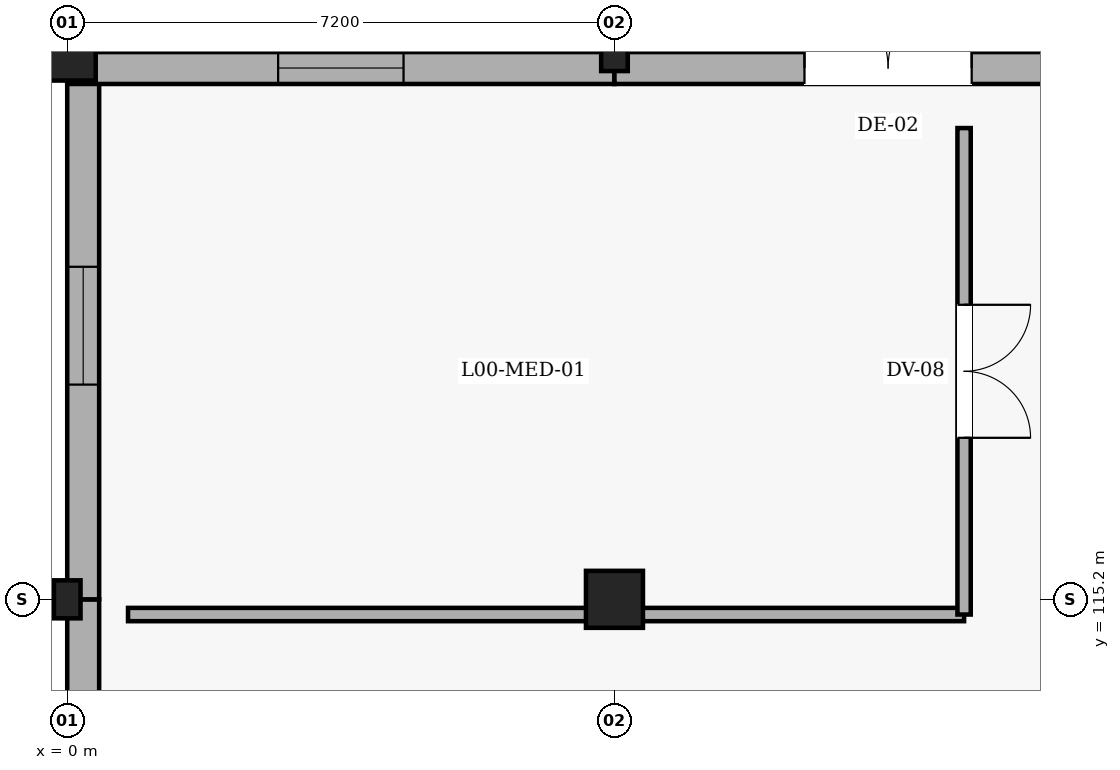
"""IFC4 building model, lengths in metres.
Left out: names, types, materials, properties, quantities, classifications, styles, units other than length and angle.
Written with IfcOpenShell. Run it as: python <this file> out.ifc"""

import sys

from ifc_helpers import new_model, si_unit, direction, frame, frame_2d, origin, origin_2d, place, context, subcontext, project, spatial, rectangle, extrude, element, fill, save


model = new_model("IFC4")
c1 = context("Model", 3, precision=1e-05, world=origin(), true_north=direction((0.0, 1.0)))
c2 = subcontext(c1, "Body", "Model", "MODEL_VIEW")
j1 = project(units=[si_unit("LENGTHUNIT", "METRE"), si_unit("PLANEANGLEUNIT", "RADIAN")], contexts=[c1])
p1 = place(None, origin())
s1 = spatial("IfcSite", under=j1, at=p1, CompositionType="ELEMENT")
p2 = place(p1, origin())
s2 = spatial("IfcBuilding", under=s1, at=p2, CompositionType="ELEMENT")
p3 = place(p2, origin())
s3 = spatial("IfcBuildingStorey", under=s2, at=p3, CompositionType="ELEMENT", Elevation=0.0)
p4 = place(p3, frame((0.0, 115.2, 0.0), z_axis=(0.0, 0.0, 1.0), x_axis=(1.0, 0.0, 0.0)))
e1 = element("IfcColumn", 1, at=p4, inside=s3, PredefinedType="PILASTER", context=c2, shape_type="SweptSolid", body=[
    extrude(rectangle(XDim=0.35, YDim=0.5, at=origin_2d()), origin(), (0.0, 0.0, 1.0), 5.08),
])
for number, where, z_axis, x_axis in (
    (2, (0.0, 122.4, 0.0), (0.0, 0.0, 1.0), (1.0, 0.0, 0.0)),
    (3, (7.2, 115.2, 0.0), (0.0, 0.0, 1.0), (1.0, 0.0, 0.0)),
):
    element("IfcColumn", number, at=place(p3, frame(where, z_axis=z_axis, x_axis=x_axis)), inside=s3, PredefinedType="COLUMN", context=c2, shape_type="SweptSolid", body=[
        extrude(rectangle(XDim=0.75, YDim=0.75, at=origin_2d()), origin(), (0.0, 0.0, 1.0), 5.08),
    ])
p5 = place(p3, frame((7.2, 122.4, 0.0), z_axis=(0.0, 0.0, 1.0), x_axis=(1.0, 0.0, 0.0)))
e4 = element("IfcColumn", 4, at=p5, inside=s3, PredefinedType="PILASTER", context=c2, shape_type="SweptSolid", body=[
    extrude(rectangle(XDim=0.35, YDim=0.5, at=origin_2d()), origin(), (0.0, 0.0, 1.0), 5.08),
])
p6 = place(p3, frame((0.21, 108.0, 0.0), z_axis=(0.0, 0.0, 1.0), x_axis=(0.0, 1.0, 0.0)))
e5 = element("IfcWall", 5, at=p6, inside=s3, PredefinedType="SOLIDWALL", context=c2, shape_type="SweptSolid", body=[
    extrude(rectangle(XDim=7.2, YDim=0.42, at=frame_2d((3.6, 0.0))), origin(), (0.0, 0.0, 1.0), 4.75),
])
p7 = place(p6, frame((2.4, 0.0, 0.0)))
e6 = element("IfcOpeningElement", 6, at=p7, cuts=e5, PredefinedType="OPENING", context=c2, shape_type="SweptSolid", body=[
    extrude(rectangle(XDim=2.4, YDim=2.5, at=frame_2d((1.2, 1.25))), frame((0.0, 0.22, 0.0), z_axis=(0.0, -1.0, 0.0), x_axis=(1.0, 0.0, 0.0)), (0.0, 0.0, 1.0), 0.44),
])
p8 = place(p3, frame((0.21, 115.2, 0.0), z_axis=(0.0, 0.0, 1.0), x_axis=(0.0, 1.0, 0.0)))
e7 = element("IfcWall", 7, at=p8, inside=s3, PredefinedType="SOLIDWALL", context=c2, shape_type="SweptSolid", body=[
    extrude(rectangle(XDim=7.2, YDim=0.42, at=frame_2d((3.6, 0.0))), origin(), (0.0, 0.0, 1.0), 4.75),
])
p9 = place(p8, frame((2.825, 0.0, 0.9)))
e8 = element("IfcOpeningElement", 8, at=p9, cuts=e7, PredefinedType="OPENING", context=c2, shape_type="SweptSolid", body=[
    extrude(rectangle(XDim=1.55, YDim=1.35, at=frame_2d((0.775, 0.675))), frame((0.0, 0.22, 0.0), z_axis=(0.0, -1.0, 0.0), x_axis=(1.0, 0.0, 0.0)), (0.0, 0.0, 1.0), 0.44),
])
p10 = place(p3, frame((0.0, 122.19, 0.0), z_axis=(0.0, 0.0, 1.0), x_axis=(1.0, 0.0, 0.0)))
e9 = element("IfcWall", 9, at=p10, inside=s3, PredefinedType="SOLIDWALL", context=c2, shape_type="SweptSolid", body=[
    extrude(rectangle(XDim=7.2, YDim=0.42, at=frame_2d((3.6, 0.0))), origin(), (0.0, 0.0, 1.0), 4.78),
])
p11 = place(p10, frame((2.775, 0.0, 0.9)))
e10 = element("IfcOpeningElement", 10, at=p11, cuts=e9, PredefinedType="OPENING", context=c2, shape_type="SweptSolid", body=[
    extrude(rectangle(XDim=1.65, YDim=1.4, at=frame_2d((0.825, 0.7))), frame((0.0, 0.22, 0.0), z_axis=(0.0, -1.0, 0.0), x_axis=(1.0, 0.0, 0.0)), (0.0, 0.0, 1.0), 0.44),
])
p12 = place(p3, frame((7.2, 122.19, 0.0), z_axis=(0.0, 0.0, 1.0), x_axis=(1.0, 0.0, 0.0)))
e11 = element("IfcWall", 11, at=p12, inside=s3, PredefinedType="SOLIDWALL", context=c2, shape_type="SweptSolid", body=[
    extrude(rectangle(XDim=7.2, YDim=0.42, at=frame_2d((3.6, 0.0))), origin(), (0.0, 0.0, 1.0), 4.78),
])
p13 = place(p12, frame((2.5, 0.0, 0.0)))
e12 = element("IfcOpeningElement", 12, at=p13, cuts=e11, PredefinedType="OPENING", context=c2, shape_type="SweptSolid", body=[
    extrude(rectangle(XDim=2.2, YDim=2.4, at=frame_2d((1.1, 1.2))), frame((0.0, 0.22, 0.0), z_axis=(0.0, -1.0, 0.0), x_axis=(1.0, 0.0, 0.0)), (0.0, 0.0, 1.0), 0.44),
])
p14 = place(p3, frame((11.8, 115.0, 0.0), z_axis=(0.0, 0.0, 1.0), x_axis=(-1.0, 0.0, 0.0)))
e13 = element("IfcWall", 13, at=p14, inside=s3, PredefinedType="PARTITIONING", context=c2, shape_type="SweptSolid", body=[
    extrude(rectangle(XDim=11.0, YDim=0.175, at=frame_2d((5.5, 0.0))), origin(), (0.0, 0.0, 1.0), 4.63),
])
p15 = place(p3, frame((11.8, 121.4, 0.0), z_axis=(0.0, 0.0, 1.0), x_axis=(0.0, -1.0, 0.0)))
e14 = element("IfcWall", 14, at=p15, inside=s3, PredefinedType="PARTITIONING", context=c2, shape_type="SweptSolid", body=[
    extrude(rectangle(XDim=6.4, YDim=0.175, at=frame_2d((3.2, 0.0))), origin(), (0.0, 0.0, 1.0), 4.63),
])
p16 = place(p15, frame((2.325, 0.0, 0.0)))
e15 = element("IfcOpeningElement", 15, at=p16, cuts=e14, PredefinedType="OPENING", context=c2, shape_type="SweptSolid", body=[
    extrude(rectangle(XDim=1.75, YDim=2.25, at=frame_2d((0.875, 1.125))), frame((0.0, 0.097, 0.0), z_axis=(0.0, -1.0, 0.0), x_axis=(1.0, 0.0, 0.0)), (0.0, 0.0, 1.0), 0.195),
])
p17 = place(p9, origin())
e16 = element("IfcWindow", 16, at=p17, inside=s3, PartitioningType="SINGLE_PANEL", PredefinedType="WINDOW", context=c2, shape_type="SweptSolid", body=[
    extrude(rectangle(XDim=1.55, YDim=1.35, at=frame_2d((0.775, 0.675))), frame((0.0, 0.03, 0.0), z_axis=(0.0, -1.0, 0.0), x_axis=(1.0, 0.0, 0.0)), (0.0, 0.0, 1.0), 0.06),
])
fill(e8, e16)
p18 = place(p11, origin())
e17 = element("IfcWindow", 17, at=p18, inside=s3, PartitioningType="SINGLE_PANEL", PredefinedType="WINDOW", context=c2, shape_type="SweptSolid", body=[
    extrude(rectangle(XDim=1.65, YDim=1.4, at=frame_2d((0.825, 0.7))), frame((0.0, 0.03, 0.0), z_axis=(0.0, -1.0, 0.0), x_axis=(1.0, 0.0, 0.0)), (0.0, 0.0, 1.0), 0.06),
])
fill(e10, e17)
p19 = place(p13, origin())
e18 = element("IfcDoor", 18, at=p19, inside=s3, OperationType="DOUBLE_DOOR_SINGLE_SWING", PredefinedType="DOOR", context=c2, shape_type="SweptSolid", body=[
    extrude(rectangle(XDim=2.2, YDim=2.4, at=frame_2d((1.1, 1.2))), frame((0.0, 0.025, 0.0), z_axis=(0.0, -1.0, 0.0), x_axis=(1.0, 0.0, 0.0)), (0.0, 0.0, 1.0), 0.05),
])
fill(e12, e18)
p20 = place(p16, origin())
e19 = element("IfcDoor", 19, at=p20, inside=s3, OperationType="DOUBLE_DOOR_SINGLE_SWING", PredefinedType="DOOR", context=c2, shape_type="SweptSolid", body=[
    extrude(rectangle(XDim=1.75, YDim=2.25, at=frame_2d((0.875, 1.125))), frame((0.0, 0.025, 0.0), z_axis=(0.0, -1.0, 0.0), x_axis=(1.0, 0.0, 0.0)), (0.0, 0.0, 1.0), 0.05),
])
fill(e15, e19)
save(model, sys.argv[1])
